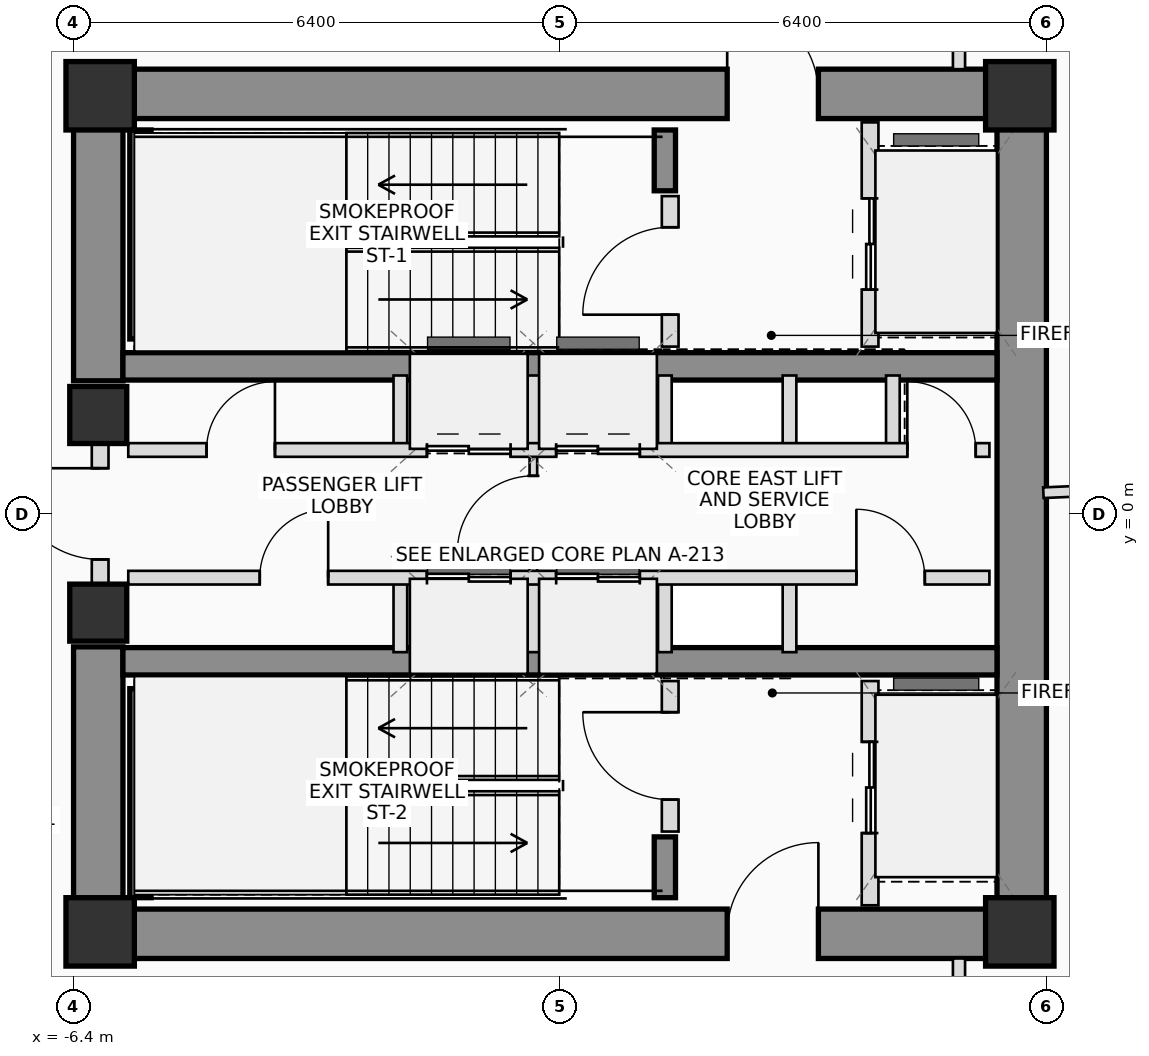
"""IFC4 building model, lengths in metres.
Left out: names, types, materials, properties, quantities, classifications, styles, units other than length and angle.
Written with IfcOpenShell. Run it as: python <this file> out.ifc"""

import sys

from ifc_helpers import new_model, si_unit, direction, frame, frame_2d, origin, origin_2d, place, context, subcontext, project, spatial, rectangle, extrude, source, transform, mapped, element, fill, save


model = new_model("IFC4")
c1 = context("Model", 3, precision=1e-05, world=origin(), true_north=direction((0.0, 1.0)))
c2 = subcontext(c1, "Body", "Model", "MODEL_VIEW")
j1 = project(units=[si_unit("LENGTHUNIT", "METRE"), si_unit("PLANEANGLEUNIT", "RADIAN")], contexts=[c1])
p1 = place(None, origin())
s1 = spatial("IfcSite", under=j1, at=p1, CompositionType="ELEMENT")
p2 = place(p1, origin())
s2 = spatial("IfcBuilding", under=s1, at=p2, CompositionType="ELEMENT")
p3 = place(p2, frame((0.0, 0.0, 143.3)))
s3 = spatial("IfcBuildingStorey", under=s2, at=p3, CompositionType="ELEMENT", Elevation=143.3)
m1 = source(origin(), c2, "Body", "SweptSolid", [
    extrude(rectangle(XDim=0.9, YDim=0.9, at=origin_2d()), origin(), (0.0, 0.0, 1.0), 3.45),
])
for number, where, z_axis, x_axis in (
    (1, (-6.05, -5.5, 0.0), (0.0, 0.0, 1.0), (1.0, 0.0, 0.0)),
    (2, (6.05, -5.5, 0.0), (0.0, 0.0, 1.0), (1.0, 0.0, 0.0)),
    (3, (6.05, 5.5, 0.0), (0.0, 0.0, 1.0), (1.0, 0.0, 0.0)),
    (4, (-6.05, 5.5, 0.0), (0.0, 0.0, 1.0), (1.0, 0.0, 0.0)),
):
    element("IfcColumn", number, at=place(p3, frame(where, z_axis=z_axis, x_axis=x_axis)), inside=s3, PredefinedType="COLUMN", context=c2, shape_type="MappedRepresentation", body=[
        mapped(m1, transform((0.0, 0.0, 0.0), scale=1.0)),
    ])
p4 = place(p3, frame((-6.4, 5.525, 0.0), z_axis=(0.0, 0.0, 1.0), x_axis=(1.0, 0.0, 0.0)))
e5 = element("IfcWall", 5, at=p4, inside=s3, PredefinedType="SHEAR", context=c2, shape_type="SweptSolid", body=[
    extrude(rectangle(XDim=12.8, YDim=0.65, at=frame_2d((6.4, 0.0))), origin(), (0.0, 0.0, 1.0), 3.45),
])
p5 = place(p4, frame((8.6, 0.0, 0.0)))
e6 = element("IfcOpeningElement", 6, at=p5, cuts=e5, PredefinedType="OPENING", context=c2, shape_type="SweptSolid", body=[
    extrude(rectangle(XDim=1.2, YDim=2.2, at=frame_2d((0.6, 1.1))), frame((0.0, 0.335, 0.0), z_axis=(0.0, -1.0, 0.0), x_axis=(1.0, 0.0, 0.0)), (0.0, 0.0, 1.0), 0.67),
])
p6 = place(p3, frame((-6.4, -5.525, 0.0), z_axis=(0.0, 0.0, 1.0), x_axis=(1.0, 0.0, 0.0)))
e7 = element("IfcWall", 7, at=p6, inside=s3, PredefinedType="SHEAR", context=c2, shape_type="SweptSolid", body=[
    extrude(rectangle(XDim=12.8, YDim=0.65, at=frame_2d((6.4, 0.0))), origin(), (0.0, 0.0, 1.0), 3.45),
])
p7 = place(p6, frame((8.6, 0.0, 0.0)))
e8 = element("IfcOpeningElement", 8, at=p7, cuts=e7, PredefinedType="OPENING", context=c2, shape_type="SweptSolid", body=[
    extrude(rectangle(XDim=1.2, YDim=2.2, at=frame_2d((0.6, 1.1))), frame((0.0, 0.335, 0.0), z_axis=(0.0, -1.0, 0.0), x_axis=(1.0, 0.0, 0.0)), (0.0, 0.0, 1.0), 0.67),
])
p8 = place(p3, frame((6.075, -5.2, 0.0), z_axis=(0.0, 0.0, 1.0), x_axis=(0.0, 1.0, 0.0)))
e9 = element("IfcWall", 9, at=p8, inside=s3, PredefinedType="SHEAR", context=c2, shape_type="SweptSolid", body=[
    extrude(rectangle(XDim=10.4, YDim=0.65, at=frame_2d((5.2, 0.0))), origin(), (0.0, 0.0, 1.0), 3.45),
])
for number, where, z_axis, x_axis in (
    (10, (-6.075, -5.2, 0.0), (0.0, 0.0, 1.0), (0.0, 1.0, 0.0)),
    (11, (-6.075, 1.75, 0.0), (0.0, 0.0, 1.0), (0.0, 1.0, 0.0)),
):
    element("IfcWall", number, at=place(p3, frame(where, z_axis=z_axis, x_axis=x_axis)), inside=s3, PredefinedType="SHEAR", context=c2, shape_type="SweptSolid", body=[
        extrude(rectangle(XDim=3.45, YDim=0.65, at=frame_2d((1.725, 0.0))), origin(), (0.0, 0.0, 1.0), 3.45),
    ])
for number, where, z_axis, x_axis in (
    (12, (-5.75, 1.94, 0.0), (0.0, 0.0, 1.0), (1.0, 0.0, 0.0)),
    (13, (-5.75, -1.94, 0.0), (0.0, 0.0, 1.0), (1.0, 0.0, 0.0)),
):
    element("IfcWall", number, at=place(p3, frame(where, z_axis=z_axis, x_axis=x_axis)), inside=s3, PredefinedType="SHEAR", context=c2, shape_type="SweptSolid", body=[
        extrude(rectangle(XDim=11.5, YDim=0.36, at=frame_2d((5.75, 0.0))), origin(), (0.0, 0.0, 1.0), 3.45),
    ])
p9 = place(p3, frame((-5.52, 2.3, 0.0), z_axis=(0.0, 0.0, 1.0), x_axis=(0.0, 1.0, 0.0)))
e14 = element("IfcWall", 14, at=p9, inside=s3, PredefinedType="SHEAR", context=c2, shape_type="SweptSolid", body=[
    extrude(rectangle(XDim=2.75, YDim=0.28, at=frame_2d((1.375, 0.0))), origin(), (0.0, 0.0, 1.0), 3.45),
])
p10 = place(p3, frame((1.38, 4.25, 0.0), z_axis=(0.0, 0.0, 1.0), x_axis=(0.0, 1.0, 0.0)))
e15 = element("IfcWall", 15, at=p10, inside=s3, PredefinedType="SHEAR", context=c2, shape_type="SweptSolid", body=[
    extrude(rectangle(XDim=0.8, YDim=0.28, at=frame_2d((0.4, 0.0))), origin(), (0.0, 0.0, 1.0), 3.45),
])
p11 = place(p3, frame((-5.52, -5.05, 0.0), z_axis=(0.0, 0.0, 1.0), x_axis=(0.0, 1.0, 0.0)))
e16 = element("IfcWall", 16, at=p11, inside=s3, PredefinedType="SHEAR", context=c2, shape_type="SweptSolid", body=[
    extrude(rectangle(XDim=2.75, YDim=0.28, at=frame_2d((1.375, 0.0))), origin(), (0.0, 0.0, 1.0), 3.45),
])
p12 = place(p3, frame((1.38, -5.05, 0.0), z_axis=(0.0, 0.0, 1.0), x_axis=(0.0, 1.0, 0.0)))
e17 = element("IfcWall", 17, at=p12, inside=s3, PredefinedType="SHEAR", context=c2, shape_type="SweptSolid", body=[
    extrude(rectangle(XDim=0.8, YDim=0.28, at=frame_2d((0.4, 0.0))), origin(), (0.0, 0.0, 1.0), 3.45),
])
m2 = source(origin(), c2, "Body", "SweptSolid", [
    extrude(rectangle(XDim=0.75, YDim=0.75, at=origin_2d()), origin(), (0.0, 0.0, 1.0), 3.45),
])
for number, where, z_axis, x_axis in (
    (18, (-6.075, -1.3, 0.0), (0.0, 0.0, 1.0), (1.0, 0.0, 0.0)),
    (19, (-6.075, 1.3, 0.0), (0.0, 0.0, 1.0), (1.0, 0.0, 0.0)),
):
    element("IfcColumn", number, at=place(p3, frame(where, z_axis=z_axis, x_axis=x_axis)), inside=s3, PredefinedType="COLUMN", context=c2, shape_type="MappedRepresentation", body=[
        mapped(m2, transform((0.0, 0.0, 0.0), scale=1.0)),
    ])
p13 = place(p3, frame((-6.05, -0.95, 0.0), z_axis=(0.0, 0.0, 1.0), x_axis=(0.0, 1.0, 0.0)))
e20 = element("IfcWall", 20, at=p13, inside=s3, PredefinedType="PLUMBINGWALL", context=c2, shape_type="SweptSolid", body=[
    extrude(rectangle(XDim=1.9, YDim=0.22, at=frame_2d((0.95, 0.0))), origin(), (0.0, 0.0, 1.0), 2.23),
])
p14 = place(p13, frame((0.35, 0.0, 0.0)))
e21 = element("IfcOpeningElement", 21, at=p14, cuts=e20, PredefinedType="OPENING", context=c2, shape_type="SweptSolid", body=[
    extrude(rectangle(XDim=1.2, YDim=2.2, at=frame_2d((0.6, 1.1))), frame((0.0, 0.12, 0.0), z_axis=(0.0, -1.0, 0.0), x_axis=(1.0, 0.0, 0.0)), (0.0, 0.0, 1.0), 0.24),
])
p15 = place(p3, frame((1.45, 2.2, 0.0), z_axis=(0.0, 0.0, 1.0), x_axis=(0.0, 1.0, 0.0)))
e22 = element("IfcWall", 22, at=p15, inside=s3, PredefinedType="PLUMBINGWALL", context=c2, shape_type="SweptSolid", body=[
    extrude(rectangle(XDim=1.98, YDim=0.22, at=frame_2d((0.99, 0.0))), origin(), (0.0, 0.0, 1.0), 3.25),
])
p16 = place(p15, frame((0.42, 0.0, 0.0)))
e23 = element("IfcOpeningElement", 23, at=p16, cuts=e22, PredefinedType="OPENING", context=c2, shape_type="SweptSolid", body=[
    extrude(rectangle(XDim=1.15, YDim=2.15, at=frame_2d((0.575, 1.075))), frame((0.0, 0.12, 0.0), z_axis=(0.0, -1.0, 0.0), x_axis=(1.0, 0.0, 0.0)), (0.0, 0.0, 1.0), 0.24),
])
p17 = place(p3, frame((4.08, 2.2, 0.0), z_axis=(0.0, 0.0, 1.0), x_axis=(0.0, 1.0, 0.0)))
e24 = element("IfcWall", 24, at=p17, inside=s3, PredefinedType="PLUMBINGWALL", context=c2, shape_type="SweptSolid", body=[
    extrude(rectangle(XDim=2.95, YDim=0.22, at=frame_2d((1.475, 0.0))), origin(), (0.0, 0.0, 1.0), 3.25),
])
p18 = place(p17, frame((0.75, 0.0, 0.0)))
e25 = element("IfcOpeningElement", 25, at=p18, cuts=e24, PredefinedType="OPENING", context=c2, shape_type="SweptSolid", body=[
    extrude(rectangle(XDim=1.2, YDim=2.25, at=frame_2d((0.6, 1.125))), frame((0.0, 0.12, 0.0), z_axis=(0.0, -1.0, 0.0), x_axis=(1.0, 0.0, 0.0)), (0.0, 0.0, 1.0), 0.24),
])
p19 = place(p3, frame((1.45, -4.18, 0.0), z_axis=(0.0, 0.0, 1.0), x_axis=(0.0, 1.0, 0.0)))
e26 = element("IfcWall", 26, at=p19, inside=s3, PredefinedType="PLUMBINGWALL", context=c2, shape_type="SweptSolid", body=[
    extrude(rectangle(XDim=1.98, YDim=0.22, at=frame_2d((0.99, 0.0))), origin(), (0.0, 0.0, 1.0), 3.25),
])
p20 = place(p19, frame((0.42, 0.0, 0.0)))
e27 = element("IfcOpeningElement", 27, at=p20, cuts=e26, PredefinedType="OPENING", context=c2, shape_type="SweptSolid", body=[
    extrude(rectangle(XDim=1.15, YDim=2.15, at=frame_2d((0.575, 1.075))), frame((0.0, 0.12, 0.0), z_axis=(0.0, -1.0, 0.0), x_axis=(1.0, 0.0, 0.0)), (0.0, 0.0, 1.0), 0.24),
])
p21 = place(p3, frame((4.08, -5.15, 0.0), z_axis=(0.0, 0.0, 1.0), x_axis=(0.0, 1.0, 0.0)))
e28 = element("IfcWall", 28, at=p21, inside=s3, PredefinedType="PLUMBINGWALL", context=c2, shape_type="SweptSolid", body=[
    extrude(rectangle(XDim=2.95, YDim=0.22, at=frame_2d((1.475, 0.0))), origin(), (0.0, 0.0, 1.0), 3.25),
])
p22 = place(p21, frame((0.95, 0.0, 0.0)))
e29 = element("IfcOpeningElement", 29, at=p22, cuts=e28, PredefinedType="OPENING", context=c2, shape_type="SweptSolid", body=[
    extrude(rectangle(XDim=1.2, YDim=2.25, at=frame_2d((0.6, 1.125))), frame((0.0, 0.12, 0.0), z_axis=(0.0, -1.0, 0.0), x_axis=(1.0, 0.0, 0.0)), (0.0, 0.0, 1.0), 0.24),
])
p23 = place(p3, frame((-0.35, -0.84, 0.0), z_axis=(0.0, 0.0, 1.0), x_axis=(0.0, 1.0, 0.0)))
e30 = element("IfcWall", 30, at=p23, inside=s3, PredefinedType="PARTITIONING", context=c2, shape_type="SweptSolid", body=[
    extrude(rectangle(XDim=1.68, YDim=0.1, at=frame_2d((0.84, 0.0))), origin(), (0.0, 0.0, 1.0), 3.25),
])
p24 = place(p23, frame((0.34, 0.0, 0.0)))
e31 = element("IfcOpeningElement", 31, at=p24, cuts=e30, PredefinedType="OPENING", context=c2, shape_type="SweptSolid", body=[
    extrude(rectangle(XDim=1.0, YDim=2.25, at=frame_2d((0.5, 1.125))), frame((0.0, 0.06, 0.0), z_axis=(0.0, -1.0, 0.0), x_axis=(1.0, 0.0, 0.0)), (0.0, 0.0, 1.0), 0.12),
])
for number, where, z_axis, x_axis in (
    (32, (-2.1, 0.84, 0.0), (0.0, 0.0, 1.0), (0.0, 1.0, 0.0)),
    (33, (-2.1, -1.82, 0.0), (0.0, 0.0, 1.0), (0.0, 1.0, 0.0)),
    (34, (-0.35, 0.84, 0.0), (0.0, 0.0, 1.0), (0.0, 1.0, 0.0)),
    (35, (-0.35, -1.82, 0.0), (0.0, 0.0, 1.0), (0.0, 1.0, 0.0)),
    (36, (1.38, 0.84, 0.0), (0.0, 0.0, 1.0), (0.0, 1.0, 0.0)),
    (37, (1.38, -1.82, 0.0), (0.0, 0.0, 1.0), (0.0, 1.0, 0.0)),
    (38, (3.02, 0.84, 0.0), (0.0, 0.0, 1.0), (0.0, 1.0, 0.0)),
    (39, (4.38, 0.84, 0.0), (0.0, 0.0, 1.0), (0.0, 1.0, 0.0)),
    (40, (3.02, -1.82, 0.0), (0.0, 0.0, 1.0), (0.0, 1.0, 0.0)),
):
    element("IfcWall", number, at=place(p3, frame(where, z_axis=z_axis, x_axis=x_axis)), inside=s3, PredefinedType="PLUMBINGWALL", context=c2, shape_type="SweptSolid", body=[
        extrude(rectangle(XDim=0.98, YDim=0.18, at=frame_2d((0.49, 0.0))), origin(), (0.0, 0.0, 1.0), 3.25),
    ])
p25 = place(p3, frame((-5.68, 0.84, 0.0), z_axis=(0.0, 0.0, 1.0), x_axis=(1.0, 0.0, 0.0)))
e41 = element("IfcWall", 41, at=p25, inside=s3, PredefinedType="PLUMBINGWALL", context=c2, shape_type="SweptSolid", body=[
    extrude(rectangle(XDim=11.33, YDim=0.18, at=frame_2d((5.665, 0.0))), origin(), (0.0, 0.0, 1.0), 3.25),
])
p26 = place(p25, frame((1.03, 0.0, 0.0)))
e42 = element("IfcOpeningElement", 42, at=p26, cuts=e41, PredefinedType="OPENING", context=c2, shape_type="SweptSolid", body=[
    extrude(rectangle(XDim=0.9, YDim=2.05, at=frame_2d((0.45, 1.025))), frame((0.0, 0.1, 0.0), z_axis=(0.0, -1.0, 0.0), x_axis=(1.0, 0.0, 0.0)), (0.0, 0.0, 1.0), 0.2),
])
p27 = place(p25, frame((3.93, 0.0, 0.0)))
e43 = element("IfcOpeningElement", 43, at=p27, cuts=e41, PredefinedType="OPENING", context=c2, shape_type="SweptSolid", body=[
    extrude(rectangle(XDim=1.1, YDim=2.2, at=frame_2d((0.55, 1.1))), frame((0.0, 0.1, 0.0), z_axis=(0.0, -1.0, 0.0), x_axis=(1.0, 0.0, 0.0)), (0.0, 0.0, 1.0), 0.2),
])
p28 = place(p25, frame((5.63, 0.0, 0.0)))
e44 = element("IfcOpeningElement", 44, at=p28, cuts=e41, PredefinedType="OPENING", context=c2, shape_type="SweptSolid", body=[
    extrude(rectangle(XDim=1.1, YDim=2.2, at=frame_2d((0.55, 1.1))), frame((0.0, 0.1, 0.0), z_axis=(0.0, -1.0, 0.0), x_axis=(1.0, 0.0, 0.0)), (0.0, 0.0, 1.0), 0.2),
])
p29 = place(p25, frame((10.25, 0.0, 0.0)))
e45 = element("IfcOpeningElement", 45, at=p29, cuts=e41, PredefinedType="OPENING", context=c2, shape_type="SweptSolid", body=[
    extrude(rectangle(XDim=0.9, YDim=2.05, at=frame_2d((0.45, 1.025))), frame((0.0, 0.1, 0.0), z_axis=(0.0, -1.0, 0.0), x_axis=(1.0, 0.0, 0.0)), (0.0, 0.0, 1.0), 0.2),
])
p30 = place(p3, frame((-5.68, -0.84, 0.0), z_axis=(0.0, 0.0, 1.0), x_axis=(1.0, 0.0, 0.0)))
e46 = element("IfcWall", 46, at=p30, inside=s3, PredefinedType="PLUMBINGWALL", context=c2, shape_type="SweptSolid", body=[
    extrude(rectangle(XDim=11.33, YDim=0.18, at=frame_2d((5.665, 0.0))), origin(), (0.0, 0.0, 1.0), 3.25),
])
p31 = place(p30, frame((1.73, 0.0, 0.0)))
e47 = element("IfcOpeningElement", 47, at=p31, cuts=e46, PredefinedType="OPENING", context=c2, shape_type="SweptSolid", body=[
    extrude(rectangle(XDim=0.9, YDim=2.05, at=frame_2d((0.45, 1.025))), frame((0.0, 0.1, 0.0), z_axis=(0.0, -1.0, 0.0), x_axis=(1.0, 0.0, 0.0)), (0.0, 0.0, 1.0), 0.2),
])
p32 = place(p30, frame((3.93, 0.0, 0.0)))
e48 = element("IfcOpeningElement", 48, at=p32, cuts=e46, PredefinedType="OPENING", context=c2, shape_type="SweptSolid", body=[
    extrude(rectangle(XDim=1.1, YDim=2.2, at=frame_2d((0.55, 1.1))), frame((0.0, 0.1, 0.0), z_axis=(0.0, -1.0, 0.0), x_axis=(1.0, 0.0, 0.0)), (0.0, 0.0, 1.0), 0.2),
])
p33 = place(p30, frame((5.63, 0.0, 0.0)))
e49 = element("IfcOpeningElement", 49, at=p33, cuts=e46, PredefinedType="OPENING", context=c2, shape_type="SweptSolid", body=[
    extrude(rectangle(XDim=1.1, YDim=2.2, at=frame_2d((0.55, 1.1))), frame((0.0, 0.1, 0.0), z_axis=(0.0, -1.0, 0.0), x_axis=(1.0, 0.0, 0.0)), (0.0, 0.0, 1.0), 0.2),
])
p34 = place(p30, frame((9.58, 0.0, 0.0)))
e50 = element("IfcOpeningElement", 50, at=p34, cuts=e46, PredefinedType="OPENING", context=c2, shape_type="SweptSolid", body=[
    extrude(rectangle(XDim=0.9, YDim=2.05, at=frame_2d((0.45, 1.025))), frame((0.0, 0.1, 0.0), z_axis=(0.0, -1.0, 0.0), x_axis=(1.0, 0.0, 0.0)), (0.0, 0.0, 1.0), 0.2),
])
p35 = place(p3, frame((5.25, 7.6, 0.0), z_axis=(0.0, 0.0, 1.0), x_axis=(0.0, -1.0, 0.0)))
e51 = element("IfcWall", 51, at=p35, inside=s3, PredefinedType="PARTITIONING", context=c2, shape_type="SweptSolid", body=[
    extrude(rectangle(XDim=1.75, YDim=0.16, at=frame_2d((0.875, 0.0))), origin(), (0.0, 0.0, 1.0), 2.605),
])
p36 = place(p3, frame((5.25, -5.85, 0.0), z_axis=(0.0, 0.0, 1.0), x_axis=(0.0, -1.0, 0.0)))
e52 = element("IfcWall", 52, at=p36, inside=s3, PredefinedType="PARTITIONING", context=c2, shape_type="SweptSolid", body=[
    extrude(rectangle(XDim=1.75, YDim=0.16, at=frame_2d((0.875, 0.0))), origin(), (0.0, 0.0, 1.0), 3.25),
])
p37 = place(p3, frame((6.36, 0.278, 0.0), z_axis=(0.0, 0.0, 1.0), x_axis=(0.999047913846, 0.043626435113, 0.0)))
e53 = element("IfcWall", 53, at=p37, inside=s3, PredefinedType="PARTITIONING", context=c2, shape_type="SweptSolid", body=[
    extrude(rectangle(XDim=9.575, YDim=0.14, at=frame_2d((4.788, 0.0))), origin(), (0.0, 0.0, 1.0), 2.605),
])
p38 = place(p5, origin())
e54 = element("IfcDoor", 54, at=p38, inside=s3, OperationType="SINGLE_SWING_LEFT", PredefinedType="DOOR", context=c2, shape_type="SweptSolid", body=[
    extrude(rectangle(XDim=1.2, YDim=2.2, at=frame_2d((0.6, 1.1))), frame((0.0, 0.025, 0.0), z_axis=(0.0, -1.0, 0.0), x_axis=(1.0, 0.0, 0.0)), (0.0, 0.0, 1.0), 0.05),
])
fill(e6, e54)
p39 = place(p7, origin())
e55 = element("IfcDoor", 55, at=p39, inside=s3, OperationType="SINGLE_SWING_RIGHT", PredefinedType="DOOR", context=c2, shape_type="SweptSolid", body=[
    extrude(rectangle(XDim=1.2, YDim=2.2, at=frame_2d((0.6, 1.1))), frame((0.0, 0.025, 0.0), z_axis=(0.0, -1.0, 0.0), x_axis=(1.0, 0.0, 0.0)), (0.0, 0.0, 1.0), 0.05),
])
fill(e8, e55)
p40 = place(p14, origin())
e56 = element("IfcDoor", 56, at=p40, inside=s3, OperationType="SINGLE_SWING_RIGHT", PredefinedType="DOOR", context=c2, shape_type="SweptSolid", body=[
    extrude(rectangle(XDim=1.2, YDim=2.2, at=frame_2d((0.6, 1.1))), frame((0.0, 0.025, 0.0), z_axis=(0.0, -1.0, 0.0), x_axis=(1.0, 0.0, 0.0)), (0.0, 0.0, 1.0), 0.05),
])
fill(e21, e56)
p41 = place(p16, origin())
e57 = element("IfcDoor", 57, at=p41, inside=s3, OperationType="SINGLE_SWING_LEFT", PredefinedType="DOOR", context=c2, shape_type="SweptSolid", body=[
    extrude(rectangle(XDim=1.15, YDim=2.15, at=frame_2d((0.575, 1.075))), frame((0.0, 0.025, 0.0), z_axis=(0.0, -1.0, 0.0), x_axis=(1.0, 0.0, 0.0)), (0.0, 0.0, 1.0), 0.05),
])
fill(e23, e57)
p42 = place(p18, origin())
e58 = element("IfcDoor", 58, at=p42, inside=s3, OperationType="DOUBLE_DOOR_SLIDING", PredefinedType="DOOR", context=c2, shape_type="SweptSolid", body=[
    extrude(rectangle(XDim=1.2, YDim=2.25, at=frame_2d((0.6, 1.125))), frame((0.0, 0.025, 0.0), z_axis=(0.0, -1.0, 0.0), x_axis=(1.0, 0.0, 0.0)), (0.0, 0.0, 1.0), 0.05),
])
fill(e25, e58)
p43 = place(p20, origin())
e59 = element("IfcDoor", 59, at=p43, inside=s3, OperationType="SINGLE_SWING_RIGHT", PredefinedType="DOOR", context=c2, shape_type="SweptSolid", body=[
    extrude(rectangle(XDim=1.15, YDim=2.15, at=frame_2d((0.575, 1.075))), frame((0.0, 0.025, 0.0), z_axis=(0.0, -1.0, 0.0), x_axis=(1.0, 0.0, 0.0)), (0.0, 0.0, 1.0), 0.05),
])
fill(e27, e59)
p44 = place(p22, origin())
e60 = element("IfcDoor", 60, at=p44, inside=s3, OperationType="DOUBLE_DOOR_SLIDING", PredefinedType="DOOR", context=c2, shape_type="SweptSolid", body=[
    extrude(rectangle(XDim=1.2, YDim=2.25, at=frame_2d((0.6, 1.125))), frame((0.0, 0.025, 0.0), z_axis=(0.0, -1.0, 0.0), x_axis=(1.0, 0.0, 0.0)), (0.0, 0.0, 1.0), 0.05),
])
fill(e29, e60)
p45 = place(p24, origin())
e61 = element("IfcDoor", 61, at=p45, inside=s3, OperationType="SINGLE_SWING_LEFT", PredefinedType="DOOR", context=c2, shape_type="SweptSolid", body=[
    extrude(rectangle(XDim=1.0, YDim=2.25, at=frame_2d((0.5, 1.125))), frame((0.0, 0.025, 0.0), z_axis=(0.0, -1.0, 0.0), x_axis=(1.0, 0.0, 0.0)), (0.0, 0.0, 1.0), 0.05),
])
fill(e31, e61)
p46 = place(p26, origin())
e62 = element("IfcDoor", 62, at=p46, inside=s3, OperationType="SINGLE_SWING_RIGHT", PredefinedType="DOOR", context=c2, shape_type="SweptSolid", body=[
    extrude(rectangle(XDim=0.9, YDim=2.05, at=frame_2d((0.45, 1.025))), frame((0.0, 0.025, 0.0), z_axis=(0.0, -1.0, 0.0), x_axis=(1.0, 0.0, 0.0)), (0.0, 0.0, 1.0), 0.05),
])
fill(e42, e62)
p47 = place(p27, origin())
e63 = element("IfcDoor", 63, at=p47, inside=s3, OperationType="DOUBLE_DOOR_SLIDING", PredefinedType="DOOR", context=c2, shape_type="SweptSolid", body=[
    extrude(rectangle(XDim=1.1, YDim=2.2, at=frame_2d((0.55, 1.1))), frame((0.0, 0.025, 0.0), z_axis=(0.0, -1.0, 0.0), x_axis=(1.0, 0.0, 0.0)), (0.0, 0.0, 1.0), 0.05),
])
fill(e43, e63)
p48 = place(p28, origin())
e64 = element("IfcDoor", 64, at=p48, inside=s3, OperationType="DOUBLE_DOOR_SLIDING", PredefinedType="DOOR", context=c2, shape_type="SweptSolid", body=[
    extrude(rectangle(XDim=1.1, YDim=2.2, at=frame_2d((0.55, 1.1))), frame((0.0, 0.025, 0.0), z_axis=(0.0, -1.0, 0.0), x_axis=(1.0, 0.0, 0.0)), (0.0, 0.0, 1.0), 0.05),
])
fill(e44, e64)
p49 = place(p29, origin())
e65 = element("IfcDoor", 65, at=p49, inside=s3, OperationType="SINGLE_SWING_LEFT", PredefinedType="DOOR", context=c2, shape_type="SweptSolid", body=[
    extrude(rectangle(XDim=0.9, YDim=2.05, at=frame_2d((0.45, 1.025))), frame((0.0, 0.025, 0.0), z_axis=(0.0, -1.0, 0.0), x_axis=(1.0, 0.0, 0.0)), (0.0, 0.0, 1.0), 0.05),
])
fill(e45, e65)
p50 = place(p31, origin())
e66 = element("IfcDoor", 66, at=p50, inside=s3, OperationType="SINGLE_SWING_RIGHT", PredefinedType="DOOR", context=c2, shape_type="SweptSolid", body=[
    extrude(rectangle(XDim=0.9, YDim=2.05, at=frame_2d((0.45, 1.025))), frame((0.0, 0.025, 0.0), z_axis=(0.0, -1.0, 0.0), x_axis=(1.0, 0.0, 0.0)), (0.0, 0.0, 1.0), 0.05),
])
fill(e47, e66)
p51 = place(p32, origin())
e67 = element("IfcDoor", 67, at=p51, inside=s3, OperationType="DOUBLE_DOOR_SLIDING", PredefinedType="DOOR", context=c2, shape_type="SweptSolid", body=[
    extrude(rectangle(XDim=1.1, YDim=2.2, at=frame_2d((0.55, 1.1))), frame((0.0, 0.025, 0.0), z_axis=(0.0, -1.0, 0.0), x_axis=(1.0, 0.0, 0.0)), (0.0, 0.0, 1.0), 0.05),
])
fill(e48, e67)
p52 = place(p33, origin())
e68 = element("IfcDoor", 68, at=p52, inside=s3, OperationType="DOUBLE_DOOR_SLIDING", PredefinedType="DOOR", context=c2, shape_type="SweptSolid", body=[
    extrude(rectangle(XDim=1.1, YDim=2.2, at=frame_2d((0.55, 1.1))), frame((0.0, 0.025, 0.0), z_axis=(0.0, -1.0, 0.0), x_axis=(1.0, 0.0, 0.0)), (0.0, 0.0, 1.0), 0.05),
])
fill(e49, e68)
p53 = place(p34, origin())
e69 = element("IfcDoor", 69, at=p53, inside=s3, OperationType="SINGLE_SWING_LEFT", PredefinedType="DOOR", context=c2, shape_type="SweptSolid", body=[
    extrude(rectangle(XDim=0.9, YDim=2.05, at=frame_2d((0.45, 1.025))), frame((0.0, 0.025, 0.0), z_axis=(0.0, -1.0, 0.0), x_axis=(1.0, 0.0, 0.0)), (0.0, 0.0, 1.0), 0.05),
])
fill(e50, e69)
save(model, sys.argv[1])
